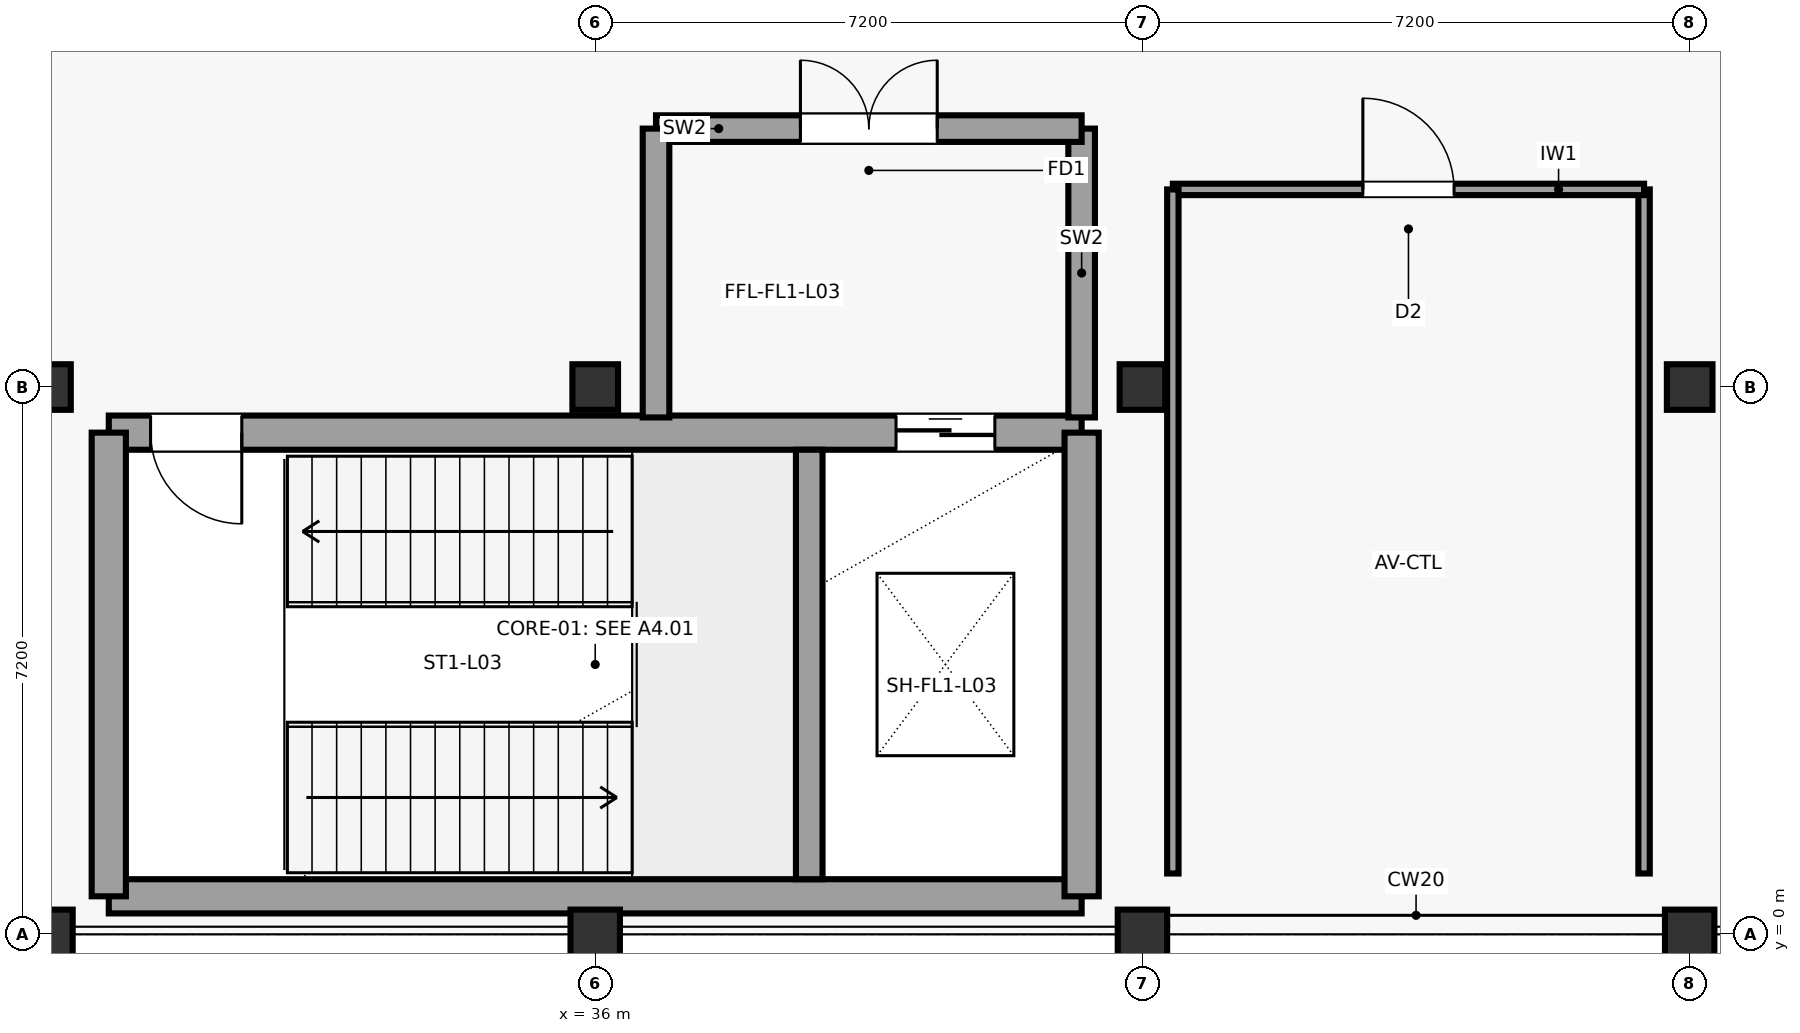
"""IFC4 building model, lengths in metres.
Left out: names, types, materials, properties, quantities, classifications, styles, units other than length and angle.
Written with IfcOpenShell. Run it as: python <this file> out.ifc"""

import sys

from ifc_helpers import new_model, si_unit, direction, frame, frame_2d, origin, origin_2d, place, context, subcontext, project, spatial, rectangle, extrude, element, fill, save


model = new_model("IFC4")
c1 = context("Model", 3, precision=1e-05, world=origin(), true_north=direction((0.0, 1.0)))
c2 = subcontext(c1, "Body", "Model", "MODEL_VIEW")
j1 = project(units=[si_unit("LENGTHUNIT", "METRE"), si_unit("PLANEANGLEUNIT", "RADIAN")], contexts=[c1])
p1 = place(None, origin())
s1 = spatial("IfcSite", under=j1, at=p1, CompositionType="ELEMENT")
p2 = place(p1, origin())
s2 = spatial("IfcBuilding", under=s1, at=p2, CompositionType="ELEMENT")
p3 = place(p2, frame((0.0, 0.0, 13.8)))
s3 = spatial("IfcBuildingStorey", under=s2, at=p3, CompositionType="ELEMENT", Elevation=13.8)
p4 = place(p3, frame((28.8, 0.0, 0.0), z_axis=(0.0, 0.0, 1.0), x_axis=(1.0, 0.0, 0.0)))
e1 = element("IfcColumn", 1, at=p4, inside=s3, PredefinedType="COLUMN", context=c2, shape_type="SweptSolid", body=[
    extrude(rectangle(XDim=0.65, YDim=0.65, at=origin_2d()), origin(), (0.0, 0.0, 1.0), 4.8),
])
p5 = place(p3, frame((28.8, 7.2, 0.0), z_axis=(0.0, 0.0, 1.0), x_axis=(1.0, 0.0, 0.0)))
e2 = element("IfcColumn", 2, at=p5, inside=s3, PredefinedType="COLUMN", context=c2, shape_type="SweptSolid", body=[
    extrude(rectangle(XDim=0.6, YDim=0.6, at=origin_2d()), origin(), (0.0, 0.0, 1.0), 4.8),
])
p6 = place(p3, frame((36.0, 0.0, 0.0), z_axis=(0.0, 0.0, 1.0), x_axis=(1.0, 0.0, 0.0)))
e3 = element("IfcColumn", 3, at=p6, inside=s3, PredefinedType="COLUMN", context=c2, shape_type="SweptSolid", body=[
    extrude(rectangle(XDim=0.65, YDim=0.65, at=origin_2d()), origin(), (0.0, 0.0, 1.0), 4.8),
])
p7 = place(p3, frame((36.0, 7.2, 0.0), z_axis=(0.0, 0.0, 1.0), x_axis=(1.0, 0.0, 0.0)))
e4 = element("IfcColumn", 4, at=p7, inside=s3, PredefinedType="COLUMN", context=c2, shape_type="SweptSolid", body=[
    extrude(rectangle(XDim=0.6, YDim=0.6, at=origin_2d()), origin(), (0.0, 0.0, 1.0), 4.8),
])
p8 = place(p3, frame((43.2, 0.0, 0.0), z_axis=(0.0, 0.0, 1.0), x_axis=(1.0, 0.0, 0.0)))
e5 = element("IfcColumn", 5, at=p8, inside=s3, PredefinedType="COLUMN", context=c2, shape_type="SweptSolid", body=[
    extrude(rectangle(XDim=0.65, YDim=0.65, at=origin_2d()), origin(), (0.0, 0.0, 1.0), 4.8),
])
p9 = place(p3, frame((43.2, 7.2, 0.0), z_axis=(0.0, 0.0, 1.0), x_axis=(1.0, 0.0, 0.0)))
e6 = element("IfcColumn", 6, at=p9, inside=s3, PredefinedType="COLUMN", context=c2, shape_type="SweptSolid", body=[
    extrude(rectangle(XDim=0.6, YDim=0.6, at=origin_2d()), origin(), (0.0, 0.0, 1.0), 4.8),
])
p10 = place(p3, frame((50.4, 0.0, 0.0), z_axis=(0.0, 0.0, 1.0), x_axis=(1.0, 0.0, 0.0)))
e7 = element("IfcColumn", 7, at=p10, inside=s3, PredefinedType="COLUMN", context=c2, shape_type="SweptSolid", body=[
    extrude(rectangle(XDim=0.65, YDim=0.65, at=origin_2d()), origin(), (0.0, 0.0, 1.0), 4.8),
])
p11 = place(p3, frame((50.4, 7.2, 0.0), z_axis=(0.0, 0.0, 1.0), x_axis=(1.0, 0.0, 0.0)))
e8 = element("IfcColumn", 8, at=p11, inside=s3, PredefinedType="COLUMN", context=c2, shape_type="SweptSolid", body=[
    extrude(rectangle(XDim=0.6, YDim=0.6, at=origin_2d()), origin(), (0.0, 0.0, 1.0), 4.8),
])
p12 = place(p3, frame((29.6, 0.5, 0.0), z_axis=(0.0, 0.0, 1.0), x_axis=(1.0, 0.0, 0.0)))
e9 = element("IfcWall", 9, at=p12, inside=s3, PredefinedType="SHEAR", context=c2, shape_type="SweptSolid", body=[
    extrude(rectangle(XDim=12.8, YDim=0.45, at=frame_2d((6.4, 0.0))), origin(), (0.0, 0.0, 1.0), 4.53),
])
p13 = place(p3, frame((29.6, 6.6, 0.0), z_axis=(0.0, 0.0, 1.0), x_axis=(1.0, 0.0, 0.0)))
e10 = element("IfcWall", 10, at=p13, inside=s3, PredefinedType="SHEAR", context=c2, shape_type="SweptSolid", body=[
    extrude(rectangle(XDim=12.8, YDim=0.45, at=frame_2d((6.4, 0.0))), origin(), (0.0, 0.0, 1.0), 4.53),
])
p14 = place(p13, frame((0.55, 0.0, 0.0)))
e11 = element("IfcOpeningElement", 11, at=p14, cuts=e10, PredefinedType="OPENING", context=c2, shape_type="SweptSolid", body=[
    extrude(rectangle(XDim=1.2, YDim=2.25, at=frame_2d((0.6, 1.125))), frame((0.0, 0.235, 0.0), z_axis=(0.0, -1.0, 0.0), x_axis=(1.0, 0.0, 0.0)), (0.0, 0.0, 1.0), 0.47),
])
p15 = place(p13, frame((10.358, 0.0, 0.0)))
e12 = element("IfcOpeningElement", 12, at=p15, cuts=e10, PredefinedType="OPENING", context=c2, shape_type="SweptSolid", body=[
    extrude(rectangle(XDim=1.3, YDim=2.25, at=frame_2d((0.65, 1.125))), frame((0.0, 0.235, 0.0), z_axis=(0.0, -1.0, 0.0), x_axis=(1.0, 0.0, 0.0)), (0.0, 0.0, 1.0), 0.47),
])
for number, where, z_axis, x_axis in (
    (13, (29.6, 0.5, 0.0), (0.0, 0.0, 1.0), (0.0, 1.0, 0.0)),
    (14, (42.4, 0.5, 0.0), (0.0, 0.0, 1.0), (0.0, 1.0, 0.0)),
):
    element("IfcWall", number, at=place(p3, frame(where, z_axis=z_axis, x_axis=x_axis)), inside=s3, PredefinedType="SHEAR", context=c2, shape_type="SweptSolid", body=[
        extrude(rectangle(XDim=6.1, YDim=0.45, at=frame_2d((3.05, 0.0))), origin(), (0.0, 0.0, 1.0), 4.53),
    ])
p16 = place(p3, frame((38.816, 0.725, 0.0), z_axis=(0.0, 0.0, 1.0), x_axis=(0.0, 1.0, 0.0)))
e15 = element("IfcWall", 15, at=p16, inside=s3, PredefinedType="SHEAR", context=c2, shape_type="SweptSolid", body=[
    extrude(rectangle(XDim=5.65, YDim=0.35, at=frame_2d((2.825, 0.0))), origin(), (0.0, 0.0, 1.0), 4.53),
])
p17 = place(p3, frame((42.4, 6.8, 0.0), z_axis=(0.0, 0.0, 1.0), x_axis=(0.0, 1.0, 0.0)))
e16 = element("IfcWall", 16, at=p17, inside=s3, PredefinedType="SHEAR", context=c2, shape_type="SweptSolid", body=[
    extrude(rectangle(XDim=3.8, YDim=0.35, at=frame_2d((1.9, 0.0))), origin(), (0.0, 0.0, 1.0), 3.59),
])
p18 = place(p3, frame((42.4, 10.6, 0.0), z_axis=(0.0, 0.0, 1.0), x_axis=(-1.0, 0.0, 0.0)))
e17 = element("IfcWall", 17, at=p18, inside=s3, PredefinedType="SHEAR", context=c2, shape_type="SweptSolid", body=[
    extrude(rectangle(XDim=5.6, YDim=0.35, at=frame_2d((2.8, 0.0))), origin(), (0.0, 0.0, 1.0), 3.59),
])
p19 = place(p18, frame((1.9, 0.0, 0.0)))
e18 = element("IfcOpeningElement", 18, at=p19, cuts=e17, PredefinedType="OPENING", context=c2, shape_type="SweptSolid", body=[
    extrude(rectangle(XDim=1.8, YDim=2.3, at=frame_2d((0.9, 1.15))), frame((0.0, 0.185, 0.0), z_axis=(0.0, -1.0, 0.0), x_axis=(1.0, 0.0, 0.0)), (0.0, 0.0, 1.0), 0.37),
])
p20 = place(p3, frame((36.8, 10.6, 0.0), z_axis=(0.0, 0.0, 1.0), x_axis=(0.0, -1.0, 0.0)))
e19 = element("IfcWall", 19, at=p20, inside=s3, PredefinedType="SHEAR", context=c2, shape_type="SweptSolid", body=[
    extrude(rectangle(XDim=3.8, YDim=0.35, at=frame_2d((1.9, 0.0))), origin(), (0.0, 0.0, 1.0), 3.59),
])
p21 = place(p3, frame((49.8, 0.8, 0.0), z_axis=(0.0, 0.0, 1.0), x_axis=(0.0, 1.0, 0.0)))
e20 = element("IfcWall", 20, at=p21, inside=s3, PredefinedType="PARTITIONING", context=c2, shape_type="SweptSolid", body=[
    extrude(rectangle(XDim=9.0, YDim=0.15, at=frame_2d((4.5, 0.0))), origin(), (0.0, 0.0, 1.0), 3.59),
])
p22 = place(p3, frame((49.8, 9.8, 0.0), z_axis=(0.0, 0.0, 1.0), x_axis=(-1.0, 0.0, 0.0)))
e21 = element("IfcWall", 21, at=p22, inside=s3, PredefinedType="PARTITIONING", context=c2, shape_type="SweptSolid", body=[
    extrude(rectangle(XDim=6.2, YDim=0.15, at=frame_2d((3.1, 0.0))), origin(), (0.0, 0.0, 1.0), 3.59),
])
p23 = place(p22, frame((2.5, 0.0, 0.0)))
e22 = element("IfcOpeningElement", 22, at=p23, cuts=e21, PredefinedType="OPENING", context=c2, shape_type="SweptSolid", body=[
    extrude(rectangle(XDim=1.2, YDim=2.2, at=frame_2d((0.6, 1.1))), frame((0.0, 0.085, 0.0), z_axis=(0.0, -1.0, 0.0), x_axis=(1.0, 0.0, 0.0)), (0.0, 0.0, 1.0), 0.17),
])
p24 = place(p3, frame((43.6, 9.8, 0.0), z_axis=(0.0, 0.0, 1.0), x_axis=(0.0, -1.0, 0.0)))
e23 = element("IfcWall", 23, at=p24, inside=s3, PredefinedType="PARTITIONING", context=c2, shape_type="SweptSolid", body=[
    extrude(rectangle(XDim=9.0, YDim=0.15, at=frame_2d((4.5, 0.0))), origin(), (0.0, 0.0, 1.0), 3.59),
])
p25 = place(p14, frame((1.2, 0.0, 0.0), z_axis=(0.0, 0.0, 1.0), x_axis=(-1.0, 0.0, 0.0)))
e24 = element("IfcDoor", 24, at=p25, inside=s3, OperationType="SINGLE_SWING_RIGHT", PredefinedType="DOOR", context=c2, shape_type="SweptSolid", body=[
    extrude(rectangle(XDim=1.2, YDim=2.25, at=frame_2d((0.6, 1.125))), frame((0.0, 0.025, 0.0), z_axis=(0.0, -1.0, 0.0), x_axis=(1.0, 0.0, 0.0)), (0.0, 0.0, 1.0), 0.05),
])
fill(e11, e24)
p26 = place(p15, origin())
e25 = element("IfcDoor", 25, at=p26, inside=s3, OperationType="SLIDING_TO_LEFT", PredefinedType="DOOR", context=c2, shape_type="SweptSolid", body=[
    extrude(rectangle(XDim=1.3, YDim=2.25, at=frame_2d((0.65, 1.125))), frame((0.0, 0.025, 0.0), z_axis=(0.0, -1.0, 0.0), x_axis=(1.0, 0.0, 0.0)), (0.0, 0.0, 1.0), 0.05),
])
fill(e12, e25)
p27 = place(p19, frame((1.8, 0.0, 0.0), z_axis=(0.0, 0.0, 1.0), x_axis=(-1.0, 0.0, 0.0)))
e26 = element("IfcDoor", 26, at=p27, inside=s3, OperationType="DOUBLE_DOOR_SINGLE_SWING", PredefinedType="DOOR", context=c2, shape_type="SweptSolid", body=[
    extrude(rectangle(XDim=1.8, YDim=2.3, at=frame_2d((0.9, 1.15))), frame((0.0, 0.025, 0.0), z_axis=(0.0, -1.0, 0.0), x_axis=(1.0, 0.0, 0.0)), (0.0, 0.0, 1.0), 0.05),
])
fill(e18, e26)
p28 = place(p23, frame((1.2, 0.0, 0.0), z_axis=(0.0, 0.0, 1.0), x_axis=(-1.0, 0.0, 0.0)))
e27 = element("IfcDoor", 27, at=p28, inside=s3, OperationType="SINGLE_SWING_RIGHT", PredefinedType="DOOR", context=c2, shape_type="SweptSolid", body=[
    extrude(rectangle(XDim=1.2, YDim=2.2, at=frame_2d((0.6, 1.1))), frame((0.0, 0.025, 0.0), z_axis=(0.0, -1.0, 0.0), x_axis=(1.0, 0.0, 0.0)), (0.0, 0.0, 1.0), 0.05),
])
fill(e22, e27)
save(model, sys.argv[1])
